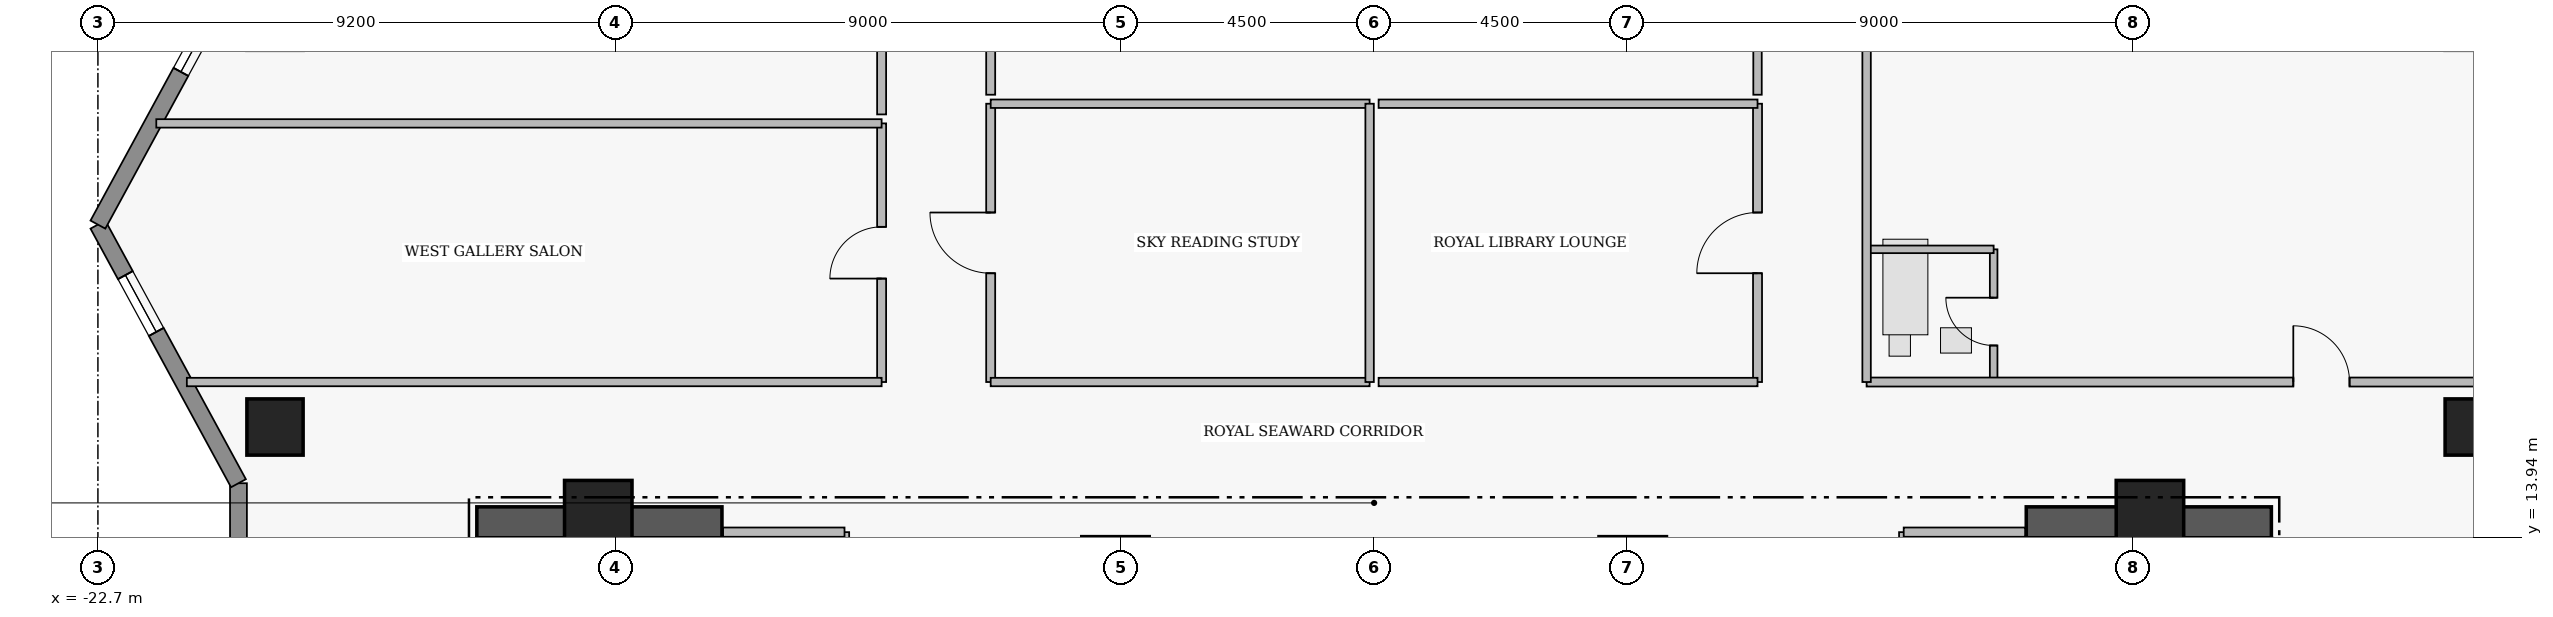
"""IFC4 building model, lengths in metres.
Left out: names, types, materials, properties, quantities, classifications, styles, units other than length and angle.
Written with IfcOpenShell. Run it as: python <this file> out.ifc"""

import sys

from ifc_helpers import new_model, si_unit, direction, frame, frame_2d, origin, origin_2d, place, context, subcontext, project, spatial, rectangle, extrude, element, fill, save


model = new_model("IFC4")
c1 = context("Model", 3, precision=1e-05, world=origin(), true_north=direction((0.0, 1.0)))
c2 = subcontext(c1, "Body", "Model", "MODEL_VIEW")
j1 = project(units=[si_unit("LENGTHUNIT", "METRE"), si_unit("PLANEANGLEUNIT", "RADIAN")], contexts=[c1])
p1 = place(None, origin())
s1 = spatial("IfcSite", under=j1, at=p1, CompositionType="ELEMENT")
p2 = place(p1, origin())
s2 = spatial("IfcBuilding", under=s1, at=p2, CompositionType="ELEMENT")
p3 = place(p2, frame((0.0, 0.0, 261.85)))
s3 = spatial("IfcBuildingStorey", under=s2, at=p3, CompositionType="ELEMENT", Elevation=261.85)
for number, where, z_axis, x_axis in (
    (1, (-15.96, 14.205, 0.0), (0.0, 0.0, 1.0), (1.0, 0.0, 0.0)),
    (2, (11.6, 14.205, 0.0), (0.0, 0.0, 1.0), (1.0, 0.0, 0.0)),
):
    element("IfcWall", number, at=place(p3, frame(where, z_axis=z_axis, x_axis=x_axis)), inside=s3, PredefinedType="SHEAR", context=c2, shape_type="SweptSolid", body=[
        extrude(rectangle(XDim=4.36, YDim=0.55, at=frame_2d((2.18, 0.0))), origin(), (0.0, 0.0, 1.0), 3.51),
    ])
for number, where, z_axis, x_axis in (
    (3, (-13.8, 14.35, 0.0), (0.0, 0.0, 1.0), (1.0, 0.0, 0.0)),
    (4, (-4.6, 13.35, 0.0), (0.0, 0.0, 1.0), (1.0, 0.0, 0.0)),
    (5, (4.6, 13.35, 0.0), (0.0, 0.0, 1.0), (1.0, 0.0, 0.0)),
    (6, (13.8, 14.35, 0.0), (0.0, 0.0, 1.0), (1.0, 0.0, 0.0)),
):
    element("IfcColumn", number, at=place(p3, frame(where, z_axis=z_axis, x_axis=x_axis)), inside=s3, PredefinedType="COLUMN", context=c2, shape_type="SweptSolid", body=[
        extrude(rectangle(XDim=1.2, YDim=1.2, at=origin_2d()), origin(), (0.0, 0.0, 1.0), 3.7),
    ])
for number, where, z_axis, x_axis in (
    (7, (-19.55, 15.9, 0.0), (0.0, 0.0, 1.0), (1.0, 0.0, 0.0)),
    (8, (19.55, 15.9, 0.0), (0.0, 0.0, 1.0), (1.0, 0.0, 0.0)),
):
    element("IfcColumn", number, at=place(p3, frame(where, z_axis=z_axis, x_axis=x_axis)), inside=s3, PredefinedType="COLUMN", context=c2, shape_type="SweptSolid", body=[
        extrude(rectangle(XDim=1.0, YDim=1.0, at=origin_2d()), origin(), (0.0, 0.0, 1.0), 3.7),
    ])
p4 = place(p3, frame((-20.2, 13.75, 0.0), z_axis=(0.0, 0.0, 1.0), x_axis=(0.0, 1.0, 0.0)))
e9 = element("IfcWall", 9, at=p4, inside=s3, PredefinedType="STANDARD", context=c2, shape_type="SweptSolid", body=[
    extrude(rectangle(XDim=1.15, YDim=0.3, at=frame_2d((0.575, 0.0))), origin(), (0.0, 0.0, 1.0), 3.48),
])
p5 = place(p3, frame((-20.2, 14.9, 0.0), z_axis=(0.0, 0.0, 1.0), x_axis=(-0.477505494629, 0.878628762675, 0.0)))
e10 = element("IfcWall", 10, at=p5, inside=s3, PredefinedType="STANDARD", context=c2, shape_type="SweptSolid", body=[
    extrude(rectangle(XDim=5.236, YDim=0.3, at=frame_2d((2.618, 0.0))), origin(), (0.0, 0.0, 1.0), 3.48),
])
p6 = place(p5, frame((3.063, 0.0, 1.25)))
e11 = element("IfcOpeningElement", 11, at=p6, cuts=e10, PredefinedType="OPENING", context=c2, shape_type="SweptSolid", body=[
    extrude(rectangle(XDim=1.15, YDim=1.55, at=frame_2d((0.575, 0.775))), frame((0.0, 0.16, 0.0), z_axis=(0.0, -1.0, 0.0), x_axis=(1.0, 0.0, 0.0)), (0.0, 0.0, 1.0), 0.32),
])
p7 = place(p3, frame((-22.7, 19.5, 0.0), z_axis=(0.0, 0.0, 1.0), x_axis=(0.477505494629, 0.878628762675, 0.0)))
e12 = element("IfcWall", 12, at=p7, inside=s3, PredefinedType="STANDARD", context=c2, shape_type="SweptSolid", body=[
    extrude(rectangle(XDim=5.236, YDim=0.3, at=frame_2d((2.618, 0.0))), origin(), (0.0, 0.0, 1.0), 3.48),
])
p8 = place(p7, frame((3.091, 0.0, 1.25)))
e13 = element("IfcOpeningElement", 13, at=p8, cuts=e12, PredefinedType="OPENING", context=c2, shape_type="SweptSolid", body=[
    extrude(rectangle(XDim=1.15, YDim=1.55, at=frame_2d((0.575, 0.775))), frame((0.0, 0.16, 0.0), z_axis=(0.0, -1.0, 0.0), x_axis=(1.0, 0.0, 0.0)), (0.0, 0.0, 1.0), 0.32),
])
p9 = place(p3, frame((-6.82, 16.7, 0.0), z_axis=(0.0, 0.0, 1.0), x_axis=(0.0, 1.0, 0.0)))
e14 = element("IfcWall", 14, at=p9, inside=s3, PredefinedType="PARTITIONING", context=c2, shape_type="SweptSolid", body=[
    extrude(rectangle(XDim=4.95, YDim=0.16, at=frame_2d((2.475, 0.0))), origin(), (0.0, 0.0, 1.0), 3.48),
])
p10 = place(p9, frame((1.935, 0.0, 0.0)))
e15 = element("IfcOpeningElement", 15, at=p10, cuts=e14, PredefinedType="OPENING", context=c2, shape_type="SweptSolid", body=[
    extrude(rectangle(XDim=1.08, YDim=2.18, at=frame_2d((0.54, 1.09))), frame((0.0, 0.09, 0.0), z_axis=(0.0, -1.0, 0.0), x_axis=(1.0, 0.0, 0.0)), (0.0, 0.0, 1.0), 0.18),
])
p11 = place(p3, frame((6.82, 16.7, 0.0), z_axis=(0.0, 0.0, 1.0), x_axis=(0.0, 1.0, 0.0)))
e16 = element("IfcWall", 16, at=p11, inside=s3, PredefinedType="PARTITIONING", context=c2, shape_type="SweptSolid", body=[
    extrude(rectangle(XDim=4.95, YDim=0.16, at=frame_2d((2.475, 0.0))), origin(), (0.0, 0.0, 1.0), 3.48),
])
p12 = place(p11, frame((1.935, 0.0, 0.0)))
e17 = element("IfcOpeningElement", 17, at=p12, cuts=e16, PredefinedType="OPENING", context=c2, shape_type="SweptSolid", body=[
    extrude(rectangle(XDim=1.08, YDim=2.18, at=frame_2d((0.54, 1.09))), frame((0.0, 0.09, 0.0), z_axis=(0.0, -1.0, 0.0), x_axis=(1.0, 0.0, 0.0)), (0.0, 0.0, 1.0), 0.18),
])
p13 = place(p3, frame((-6.82, 21.81, 0.0), z_axis=(0.0, 0.0, 1.0), x_axis=(0.0, 1.0, 0.0)))
e18 = element("IfcWall", 18, at=p13, inside=s3, PredefinedType="PARTITIONING", context=c2, shape_type="SweptSolid", body=[
    extrude(rectangle(XDim=5.11, YDim=0.16, at=frame_2d((2.555, 0.0))), origin(), (0.0, 0.0, 1.0), 3.48),
])
p14 = place(p13, frame((2.015, 0.0, 0.0)))
e19 = element("IfcOpeningElement", 19, at=p14, cuts=e18, PredefinedType="OPENING", context=c2, shape_type="SweptSolid", body=[
    extrude(rectangle(XDim=1.08, YDim=2.18, at=frame_2d((0.54, 1.09))), frame((0.0, 0.09, 0.0), z_axis=(0.0, -1.0, 0.0), x_axis=(1.0, 0.0, 0.0)), (0.0, 0.0, 1.0), 0.18),
])
p15 = place(p3, frame((-8.76, 16.7, 0.0), z_axis=(0.0, 0.0, 1.0), x_axis=(0.0, 1.0, 0.0)))
e20 = element("IfcWall", 20, at=p15, inside=s3, PredefinedType="PARTITIONING", context=c2, shape_type="SweptSolid", body=[
    extrude(rectangle(XDim=4.6, YDim=0.16, at=frame_2d((2.3, 0.0))), origin(), (0.0, 0.0, 1.0), 3.48),
])
p16 = place(p15, frame((1.84, 0.0, 0.0)))
e21 = element("IfcOpeningElement", 21, at=p16, cuts=e20, PredefinedType="OPENING", context=c2, shape_type="SweptSolid", body=[
    extrude(rectangle(XDim=0.92, YDim=2.12, at=frame_2d((0.46, 1.06))), frame((0.0, 0.09, 0.0), z_axis=(0.0, -1.0, 0.0), x_axis=(1.0, 0.0, 0.0)), (0.0, 0.0, 1.0), 0.18),
])
p17 = place(p3, frame((-8.76, 21.46, 0.0), z_axis=(0.0, 0.0, 1.0), x_axis=(0.0, 1.0, 0.0)))
e22 = element("IfcWall", 22, at=p17, inside=s3, PredefinedType="PARTITIONING", context=c2, shape_type="SweptSolid", body=[
    extrude(rectangle(XDim=4.64, YDim=0.16, at=frame_2d((2.32, 0.0))), origin(), (0.0, 0.0, 1.0), 3.48),
])
p18 = place(p17, frame((1.86, 0.0, 0.0)))
e23 = element("IfcOpeningElement", 23, at=p18, cuts=e22, PredefinedType="OPENING", context=c2, shape_type="SweptSolid", body=[
    extrude(rectangle(XDim=0.92, YDim=2.12, at=frame_2d((0.46, 1.06))), frame((0.0, 0.09, 0.0), z_axis=(0.0, -1.0, 0.0), x_axis=(1.0, 0.0, 0.0)), (0.0, 0.0, 1.0), 0.18),
])
p19 = place(p3, frame((11.02, 16.7, 0.0), z_axis=(0.0, 0.0, 1.0), x_axis=(0.0, 1.0, 0.0)))
e24 = element("IfcWall", 24, at=p19, inside=s3, PredefinedType="PLUMBINGWALL", context=c2, shape_type="SweptSolid", body=[
    extrude(rectangle(XDim=2.36, YDim=0.135, at=frame_2d((1.18, 0.0))), origin(), (0.0, 0.0, 1.0), 3.48),
])
p20 = place(p19, frame((0.65, 0.0, 0.0)))
e25 = element("IfcOpeningElement", 25, at=p20, cuts=e24, PredefinedType="OPENING", context=c2, shape_type="SweptSolid", body=[
    extrude(rectangle(XDim=0.85, YDim=2.1, at=frame_2d((0.425, 1.05))), frame((0.0, 0.077, 0.0), z_axis=(0.0, -1.0, 0.0), x_axis=(1.0, 0.0, 0.0)), (0.0, 0.0, 1.0), 0.155),
])
p21 = place(p3, frame((8.76, 16.7, 0.0), z_axis=(0.0, 0.0, 1.0), x_axis=(1.0, 0.0, 0.0)))
e26 = element("IfcWall", 26, at=p21, inside=s3, PredefinedType="PARTITIONING", context=c2, shape_type="SweptSolid", body=[
    extrude(rectangle(XDim=13.88, YDim=0.16, at=frame_2d((6.94, 0.0))), origin(), (0.0, 0.0, 1.0), 3.076),
])
p22 = place(p21, frame((7.59, 0.0, 0.0)))
e27 = element("IfcOpeningElement", 27, at=p22, cuts=e26, PredefinedType="OPENING", context=c2, shape_type="SweptSolid", body=[
    extrude(rectangle(XDim=1.0, YDim=2.15, at=frame_2d((0.5, 1.075))), frame((0.0, 0.09, 0.0), z_axis=(0.0, -1.0, 0.0), x_axis=(1.0, 0.0, 0.0)), (0.0, 0.0, 1.0), 0.18),
])
p23 = place(p3, frame((-9.42, 11.07, 0.0), z_axis=(0.0, 0.0, 1.0), x_axis=(0.0, 1.0, 0.0)))
e28 = element("IfcWall", 28, at=p23, inside=s3, PredefinedType="PARTITIONING", context=c2, shape_type="SweptSolid", body=[
    extrude(rectangle(XDim=2.96, YDim=0.165, at=frame_2d((1.48, 0.0))), origin(), (0.0, 0.0, 1.0), 3.48),
])
p24 = place(p3, frame((-11.58, 14.03, 0.0), z_axis=(0.0, 0.0, 1.0), x_axis=(1.0, 0.0, 0.0)))
e29 = element("IfcWall", 29, at=p24, inside=s3, PredefinedType="PARTITIONING", context=c2, shape_type="SweptSolid", body=[
    extrude(rectangle(XDim=2.16, YDim=0.165, at=frame_2d((1.08, 0.0))), origin(), (0.0, 0.0, 1.0), 3.48),
])
p25 = place(p3, frame((9.42, 11.07, 0.0), z_axis=(0.0, 0.0, 1.0), x_axis=(0.0, 1.0, 0.0)))
e30 = element("IfcWall", 30, at=p25, inside=s3, PredefinedType="PARTITIONING", context=c2, shape_type="SweptSolid", body=[
    extrude(rectangle(XDim=2.96, YDim=0.165, at=frame_2d((1.48, 0.0))), origin(), (0.0, 0.0, 1.0), 3.48),
])
p26 = place(p3, frame((9.42, 14.03, 0.0), z_axis=(0.0, 0.0, 1.0), x_axis=(1.0, 0.0, 0.0)))
e31 = element("IfcWall", 31, at=p26, inside=s3, PredefinedType="PARTITIONING", context=c2, shape_type="SweptSolid", body=[
    extrude(rectangle(XDim=2.16, YDim=0.165, at=frame_2d((1.08, 0.0))), origin(), (0.0, 0.0, 1.0), 3.48),
])
for number, where, z_axis, x_axis in (
    (32, (-6.82, 16.7, 0.0), (0.0, 0.0, 1.0), (1.0, 0.0, 0.0)),
    (33, (-6.82, 21.65, 0.0), (0.0, 0.0, 1.0), (1.0, 0.0, 0.0)),
):
    element("IfcWall", number, at=place(p3, frame(where, z_axis=z_axis, x_axis=x_axis)), inside=s3, PredefinedType="PARTITIONING", context=c2, shape_type="SweptSolid", body=[
        extrude(rectangle(XDim=6.74, YDim=0.15, at=frame_2d((3.37, 0.0))), origin(), (0.0, 0.0, 1.0), 3.076),
    ])
p27 = place(p3, frame((-0.08, 16.7, 0.0), z_axis=(0.0, 0.0, 1.0), x_axis=(0.0, 1.0, 0.0)))
e34 = element("IfcWall", 34, at=p27, inside=s3, PredefinedType="PARTITIONING", context=c2, shape_type="SweptSolid", body=[
    extrude(rectangle(XDim=4.95, YDim=0.15, at=frame_2d((2.475, 0.0))), origin(), (0.0, 0.0, 1.0), 3.48),
])
for number, where, z_axis, x_axis in (
    (35, (0.08, 16.7, 0.0), (0.0, 0.0, 1.0), (1.0, 0.0, 0.0)),
    (36, (0.08, 21.65, 0.0), (0.0, 0.0, 1.0), (1.0, 0.0, 0.0)),
):
    element("IfcWall", number, at=place(p3, frame(where, z_axis=z_axis, x_axis=x_axis)), inside=s3, PredefinedType="PARTITIONING", context=c2, shape_type="SweptSolid", body=[
        extrude(rectangle(XDim=6.74, YDim=0.15, at=frame_2d((3.37, 0.0))), origin(), (0.0, 0.0, 1.0), 3.076),
    ])
p28 = place(p3, frame((6.82, 21.81, 0.0), z_axis=(0.0, 0.0, 1.0), x_axis=(0.0, 1.0, 0.0)))
e37 = element("IfcWall", 37, at=p28, inside=s3, PredefinedType="PARTITIONING", context=c2, shape_type="SweptSolid", body=[
    extrude(rectangle(XDim=5.11, YDim=0.15, at=frame_2d((2.555, 0.0))), origin(), (0.0, 0.0, 1.0), 3.48),
])
p29 = place(p3, frame((-21.118, 16.7, 0.0), z_axis=(0.0, 0.0, 1.0), x_axis=(1.0, 0.0, 0.0)))
e38 = element("IfcWall", 38, at=p29, inside=s3, PredefinedType="PARTITIONING", context=c2, shape_type="SweptSolid", body=[
    extrude(rectangle(XDim=12.358, YDim=0.15, at=frame_2d((6.179, 0.0))), origin(), (0.0, 0.0, 1.0), 3.076),
])
p30 = place(p3, frame((-21.662, 21.3, 0.0), z_axis=(0.0, 0.0, 1.0), x_axis=(1.0, 0.0, 0.0)))
e39 = element("IfcWall", 39, at=p30, inside=s3, PredefinedType="PARTITIONING", context=c2, shape_type="SweptSolid", body=[
    extrude(rectangle(XDim=12.902, YDim=0.15, at=frame_2d((6.451, 0.0))), origin(), (0.0, 0.0, 1.0), 3.48),
])
p31 = place(p3, frame((8.76, 19.06, 0.0), z_axis=(0.0, 0.0, 1.0), x_axis=(1.0, 0.0, 0.0)))
e40 = element("IfcWall", 40, at=p31, inside=s3, PredefinedType="PLUMBINGWALL", context=c2, shape_type="SweptSolid", body=[
    extrude(rectangle(XDim=2.26, YDim=0.135, at=frame_2d((1.13, 0.0))), origin(), (0.0, 0.0, 1.0), 3.076),
])
p32 = place(p3, frame((8.76, 16.7, 0.0), z_axis=(0.0, 0.0, 1.0), x_axis=(0.0, 1.0, 0.0)))
e41 = element("IfcWall", 41, at=p32, inside=s3, PredefinedType="PARTITIONING", context=c2, shape_type="SweptSolid", body=[
    extrude(rectangle(XDim=12.68, YDim=0.15, at=frame_2d((6.34, 0.0))), origin(), (0.0, 0.0, 1.0), 3.48),
])
p33 = place(p6, origin())
e42 = element("IfcWindow", 42, at=p33, inside=s3, PartitioningType="SINGLE_PANEL", PredefinedType="WINDOW", context=c2, shape_type="SweptSolid", body=[
    extrude(rectangle(XDim=1.15, YDim=1.55, at=frame_2d((0.575, 0.775))), frame((0.0, 0.03, 0.0), z_axis=(0.0, -1.0, 0.0), x_axis=(1.0, 0.0, 0.0)), (0.0, 0.0, 1.0), 0.06),
])
fill(e11, e42)
p34 = place(p8, origin())
e43 = element("IfcWindow", 43, at=p34, inside=s3, PartitioningType="SINGLE_PANEL", PredefinedType="WINDOW", context=c2, shape_type="SweptSolid", body=[
    extrude(rectangle(XDim=1.15, YDim=1.55, at=frame_2d((0.575, 0.775))), frame((0.0, 0.03, 0.0), z_axis=(0.0, -1.0, 0.0), x_axis=(1.0, 0.0, 0.0)), (0.0, 0.0, 1.0), 0.06),
])
fill(e13, e43)
p35 = place(p10, origin())
e44 = element("IfcDoor", 44, at=p35, inside=s3, OperationType="SINGLE_SWING_RIGHT", PredefinedType="DOOR", context=c2, shape_type="SweptSolid", body=[
    extrude(rectangle(XDim=1.08, YDim=2.18, at=frame_2d((0.54, 1.09))), frame((0.0, 0.025, 0.0), z_axis=(0.0, -1.0, 0.0), x_axis=(1.0, 0.0, 0.0)), (0.0, 0.0, 1.0), 0.05),
])
fill(e15, e44)
p36 = place(p12, origin())
e45 = element("IfcDoor", 45, at=p36, inside=s3, OperationType="SINGLE_SWING_LEFT", PredefinedType="DOOR", context=c2, shape_type="SweptSolid", body=[
    extrude(rectangle(XDim=1.08, YDim=2.18, at=frame_2d((0.54, 1.09))), frame((0.0, 0.025, 0.0), z_axis=(0.0, -1.0, 0.0), x_axis=(1.0, 0.0, 0.0)), (0.0, 0.0, 1.0), 0.05),
])
fill(e17, e45)
p37 = place(p16, origin())
e46 = element("IfcDoor", 46, at=p37, inside=s3, OperationType="SINGLE_SWING_LEFT", PredefinedType="DOOR", context=c2, shape_type="SweptSolid", body=[
    extrude(rectangle(XDim=0.92, YDim=2.12, at=frame_2d((0.46, 1.06))), frame((0.0, 0.025, 0.0), z_axis=(0.0, -1.0, 0.0), x_axis=(1.0, 0.0, 0.0)), (0.0, 0.0, 1.0), 0.05),
])
fill(e21, e46)
p38 = place(p20, origin())
e47 = element("IfcDoor", 47, at=p38, inside=s3, OperationType="SINGLE_SWING_RIGHT", PredefinedType="DOOR", context=c2, shape_type="SweptSolid", body=[
    extrude(rectangle(XDim=0.85, YDim=2.1, at=frame_2d((0.425, 1.05))), frame((0.0, 0.025, 0.0), z_axis=(0.0, -1.0, 0.0), x_axis=(1.0, 0.0, 0.0)), (0.0, 0.0, 1.0), 0.05),
])
fill(e25, e47)
p39 = place(p22, origin())
e48 = element("IfcDoor", 48, at=p39, inside=s3, OperationType="SINGLE_SWING_LEFT", PredefinedType="DOOR", context=c2, shape_type="SweptSolid", body=[
    extrude(rectangle(XDim=1.0, YDim=2.15, at=frame_2d((0.5, 1.075))), frame((0.0, 0.025, 0.0), z_axis=(0.0, -1.0, 0.0), x_axis=(1.0, 0.0, 0.0)), (0.0, 0.0, 1.0), 0.05),
])
fill(e27, e48)
save(model, sys.argv[1])
